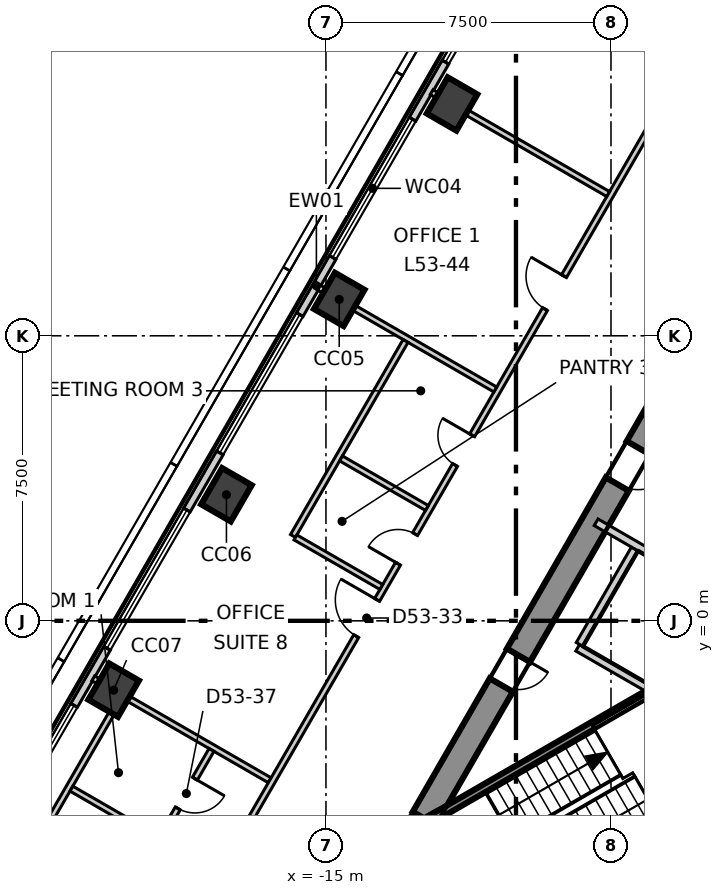
"""IFC4 building model, lengths in metres.
Left out: names, types, materials, properties, quantities, classifications, styles, units other than length and angle.
Written with IfcOpenShell. Run it as: python <this file> out.ifc"""

import sys

from ifc_helpers import new_model, si_unit, direction, frame, frame_2d, origin, origin_2d, place, context, subcontext, project, spatial, polyline, rectangle, outline, extrude, element, fill, save


model = new_model("IFC4")
c1 = context("Model", 3, precision=1e-05, world=origin(), true_north=direction((0.0, 1.0)))
c2 = subcontext(c1, "Body", "Model", "MODEL_VIEW")
j1 = project(units=[si_unit("LENGTHUNIT", "METRE"), si_unit("PLANEANGLEUNIT", "RADIAN")], contexts=[c1])
p1 = place(None, origin())
s1 = spatial("IfcSite", under=j1, at=p1, CompositionType="ELEMENT")
p2 = place(p1, origin())
s2 = spatial("IfcBuilding", under=s1, at=p2, CompositionType="ELEMENT")
p3 = place(p2, frame((0.0, 0.0, 227.3)))
s3 = spatial("IfcBuildingStorey", under=s2, at=p3, CompositionType="ELEMENT", Elevation=227.3)
p4 = place(p3, frame((-1.703, 13.35, -0.3), z_axis=(0.0, 0.0, 1.0), x_axis=(-0.500011533395, -0.866018744874, 0.0)))
e1 = element("IfcWall", 1, at=p4, inside=s3, PredefinedType="SHEAR", context=c2, shape_type="SweptSolid", body=[
    extrude(outline(polyline([(-0.202, -0.35), (1.782, -0.35), (3.766, -0.35), (5.75, -0.35), (7.734, -0.35), (9.718, -0.35), (11.702, -0.35), (13.686, -0.35), (15.67, -0.35), (17.654, -0.35), (19.638, -0.35), (21.622, -0.35), (21.218, 0.35), (19.307, 0.35), (17.397, 0.35), (15.486, 0.35), (13.576, 0.35), (11.665, 0.35), (9.755, 0.35), (7.844, 0.35), (5.934, 0.35), (4.023, 0.35), (2.113, 0.35), (0.202, 0.35), (-0.202, -0.35)])), origin(), (0.0, 0.0, 1.0), 4.0),
])
p5 = place(p4, frame((10.16, 0.0, 0.3)))
e2 = element("IfcOpeningElement", 2, at=p5, cuts=e1, PredefinedType="OPENING", context=c2, shape_type="SweptSolid", body=[
    extrude(rectangle(XDim=1.1, YDim=2.1, at=frame_2d((0.55, 1.05))), frame((0.0, 0.36, 0.0), z_axis=(0.0, -1.0, 0.0), x_axis=(1.0, 0.0, 0.0)), (0.0, 0.0, 1.0), 0.72),
])
p6 = place(p4, frame((16.465, 0.0, 0.3)))
e3 = element("IfcOpeningElement", 3, at=p6, cuts=e1, PredefinedType="OPENING", context=c2, shape_type="SweptSolid", body=[
    extrude(rectangle(XDim=0.9, YDim=2.1, at=frame_2d((0.45, 1.05))), frame((0.0, 0.36, 0.0), z_axis=(0.0, -1.0, 0.0), x_axis=(1.0, 0.0, 0.0)), (0.0, 0.0, 1.0), 0.72),
])
p7 = place(p4, frame((4.055, 0.0, 0.3)))
e4 = element("IfcOpeningElement", 4, at=p7, cuts=e1, PredefinedType="OPENING", context=c2, shape_type="SweptSolid", body=[
    extrude(rectangle(XDim=0.9, YDim=2.1, at=frame_2d((0.45, 1.05))), frame((0.0, 0.36, 0.0), z_axis=(0.0, -1.0, 0.0), x_axis=(1.0, 0.0, 0.0)), (0.0, 0.0, 1.0), 0.72),
])
for number, where, z_axis, x_axis in (
    (5, (-11.682, 13.6, -0.3), (0.0, 0.0, 1.0), (0.5, 0.866, 0.0)),
    (6, (-14.651, 8.458, -0.3), (0.0, 0.0, 1.0), (0.5, 0.866, 0.0)),
    (7, (-17.619, 3.317, -0.3), (0.0, 0.0, 1.0), (0.5, 0.866, 0.0)),
    (8, (-20.587, -1.824, -0.3), (0.0, 0.0, 1.0), (0.5, 0.866, 0.0)),
):
    element("IfcColumn", number, at=place(p3, frame(where, z_axis=z_axis, x_axis=x_axis)), inside=s3, PredefinedType="COLUMN", context=c2, shape_type="SweptSolid", body=[
        extrude(rectangle(XDim=1.1, YDim=0.9, at=origin_2d()), origin(), (0.0, 0.0, 1.0), 4.0),
    ])
p8 = place(p3, frame((-2.732, 30.501, 0.0), z_axis=(0.0, 0.0, 1.0), x_axis=(-0.500023345841, -0.866011924637, 0.0)))
e9 = element("IfcWall", 9, at=p8, inside=s3, PredefinedType="ELEMENTEDWALL", context=c2, shape_type="SweptSolid", body=[
    extrude(rectangle(XDim=50.078, YDim=0.2, at=frame_2d((25.039, 0.0))), origin(), (0.0, 0.0, 1.0), 3.7),
])
p9 = place(p8, frame((2.171, 0.0, 0.9)))
e10 = element("IfcOpeningElement", 10, at=p9, cuts=e9, PredefinedType="OPENING", context=c2, shape_type="SweptSolid", body=[
    extrude(rectangle(XDim=4.2, YDim=2.5, at=frame_2d((2.1, 1.25))), frame((0.0, 0.11, 0.0), z_axis=(0.0, -1.0, 0.0), x_axis=(1.0, 0.0, 0.0)), (0.0, 0.0, 1.0), 0.22),
])
p10 = place(p8, frame((8.107, 0.0, 0.9)))
e11 = element("IfcOpeningElement", 11, at=p10, cuts=e9, PredefinedType="OPENING", context=c2, shape_type="SweptSolid", body=[
    extrude(rectangle(XDim=4.2, YDim=2.5, at=frame_2d((2.1, 1.25))), frame((0.0, 0.11, 0.0), z_axis=(0.0, -1.0, 0.0), x_axis=(1.0, 0.0, 0.0)), (0.0, 0.0, 1.0), 0.22),
])
p11 = place(p8, frame((14.044, 0.0, 0.9)))
e12 = element("IfcOpeningElement", 12, at=p11, cuts=e9, PredefinedType="OPENING", context=c2, shape_type="SweptSolid", body=[
    extrude(rectangle(XDim=4.2, YDim=2.5, at=frame_2d((2.1, 1.25))), frame((0.0, 0.11, 0.0), z_axis=(0.0, -1.0, 0.0), x_axis=(1.0, 0.0, 0.0)), (0.0, 0.0, 1.0), 0.22),
])
p12 = place(p8, frame((19.98, 0.0, 0.9)))
e13 = element("IfcOpeningElement", 13, at=p12, cuts=e9, PredefinedType="OPENING", context=c2, shape_type="SweptSolid", body=[
    extrude(rectangle(XDim=4.2, YDim=2.5, at=frame_2d((2.1, 1.25))), frame((0.0, 0.11, 0.0), z_axis=(0.0, -1.0, 0.0), x_axis=(1.0, 0.0, 0.0)), (0.0, 0.0, 1.0), 0.22),
])
p13 = place(p8, frame((25.917, 0.0, 0.9)))
e14 = element("IfcOpeningElement", 14, at=p13, cuts=e9, PredefinedType="OPENING", context=c2, shape_type="SweptSolid", body=[
    extrude(rectangle(XDim=4.2, YDim=2.5, at=frame_2d((2.1, 1.25))), frame((0.0, 0.11, 0.0), z_axis=(0.0, -1.0, 0.0), x_axis=(1.0, 0.0, 0.0)), (0.0, 0.0, 1.0), 0.22),
])
p14 = place(p8, frame((31.853, 0.0, 0.9)))
e15 = element("IfcOpeningElement", 15, at=p14, cuts=e9, PredefinedType="OPENING", context=c2, shape_type="SweptSolid", body=[
    extrude(rectangle(XDim=4.2, YDim=2.5, at=frame_2d((2.1, 1.25))), frame((0.0, 0.11, 0.0), z_axis=(0.0, -1.0, 0.0), x_axis=(1.0, 0.0, 0.0)), (0.0, 0.0, 1.0), 0.22),
])
p15 = place(p8, frame((37.79, 0.0, 0.9)))
e16 = element("IfcOpeningElement", 16, at=p15, cuts=e9, PredefinedType="OPENING", context=c2, shape_type="SweptSolid", body=[
    extrude(rectangle(XDim=4.2, YDim=2.5, at=frame_2d((2.1, 1.25))), frame((0.0, 0.11, 0.0), z_axis=(0.0, -1.0, 0.0), x_axis=(1.0, 0.0, 0.0)), (0.0, 0.0, 1.0), 0.22),
])
p16 = place(p8, frame((43.726, 0.0, 0.9)))
e17 = element("IfcOpeningElement", 17, at=p16, cuts=e9, PredefinedType="OPENING", context=c2, shape_type="SweptSolid", body=[
    extrude(rectangle(XDim=4.2, YDim=2.5, at=frame_2d((2.1, 1.25))), frame((0.0, 0.11, 0.0), z_axis=(0.0, -1.0, 0.0), x_axis=(1.0, 0.0, 0.0)), (0.0, 0.0, 1.0), 0.22),
])
p17 = place(p3, frame((-21.124, -1.514, 0.0), z_axis=(0.0, 0.0, 1.0), x_axis=(0.866032438121, -0.499987815973, 0.0)))
e18 = element("IfcWall", 18, at=p17, inside=s3, PredefinedType="PARTITIONING", context=c2, shape_type="SweptSolid", body=[
    extrude(rectangle(XDim=5.363, YDim=0.15, at=frame_2d((2.681, 0.0))), origin(), (0.0, 0.0, 1.0), 3.7),
])
p18 = place(p3, frame((-20.882, -11.969, 0.0), z_axis=(0.0, 0.0, 1.0), x_axis=(0.499998738735, 0.866026131975, 0.0)))
e19 = element("IfcWall", 19, at=p18, inside=s3, PredefinedType="PARTITIONING", context=c2, shape_type="SweptSolid", body=[
    extrude(rectangle(XDim=41.764, YDim=0.15, at=frame_2d((20.882, 0.0))), origin(), (0.0, 0.0, 1.0), 3.7),
])
p19 = place(p18, frame((33.714, 0.0, 0.0)))
e20 = element("IfcOpeningElement", 20, at=p19, cuts=e19, PredefinedType="OPENING", context=c2, shape_type="SweptSolid", body=[
    extrude(rectangle(XDim=1.1, YDim=2.1, at=frame_2d((0.55, 1.05))), frame((0.0, 0.085, 0.0), z_axis=(0.0, -1.0, 0.0), x_axis=(1.0, 0.0, 0.0)), (0.0, 0.0, 1.0), 0.17),
])
p20 = place(p18, frame((23.293, 0.0, 0.0)))
e21 = element("IfcOpeningElement", 21, at=p20, cuts=e19, PredefinedType="OPENING", context=c2, shape_type="SweptSolid", body=[
    extrude(rectangle(XDim=1.0, YDim=2.1, at=frame_2d((0.5, 1.05))), frame((0.0, 0.085, 0.0), z_axis=(0.0, -1.0, 0.0), x_axis=(1.0, 0.0, 0.0)), (0.0, 0.0, 1.0), 0.17),
])
p21 = place(p18, frame((13.356, 0.0, 0.0)))
e22 = element("IfcOpeningElement", 22, at=p21, cuts=e19, PredefinedType="OPENING", context=c2, shape_type="SweptSolid", body=[
    extrude(rectangle(XDim=1.1, YDim=2.1, at=frame_2d((0.55, 1.05))), frame((0.0, 0.085, 0.0), z_axis=(0.0, -1.0, 0.0), x_axis=(1.0, 0.0, 0.0)), (0.0, 0.0, 1.0), 0.17),
])
p22 = place(p18, frame((18.556, 0.0, 0.0)))
e23 = element("IfcOpeningElement", 23, at=p22, cuts=e19, PredefinedType="OPENING", context=c2, shape_type="SweptSolid", body=[
    extrude(rectangle(XDim=0.9, YDim=2.1, at=frame_2d((0.45, 1.05))), frame((0.0, 0.085, 0.0), z_axis=(0.0, -1.0, 0.0), x_axis=(1.0, 0.0, 0.0)), (0.0, 0.0, 1.0), 0.17),
])
p23 = place(p18, frame((15.556, 0.0, 0.0)))
e24 = element("IfcOpeningElement", 24, at=p23, cuts=e19, PredefinedType="OPENING", context=c2, shape_type="SweptSolid", body=[
    extrude(rectangle(XDim=0.9, YDim=2.1, at=frame_2d((0.45, 1.05))), frame((0.0, 0.085, 0.0), z_axis=(0.0, -1.0, 0.0), x_axis=(1.0, 0.0, 0.0)), (0.0, 0.0, 1.0), 0.17),
])
p24 = place(p18, frame((3.883, 0.0, 0.0)))
e25 = element("IfcOpeningElement", 25, at=p24, cuts=e19, PredefinedType="OPENING", context=c2, shape_type="SweptSolid", body=[
    extrude(rectangle(XDim=1.1, YDim=2.1, at=frame_2d((0.55, 1.05))), frame((0.0, 0.085, 0.0), z_axis=(0.0, -1.0, 0.0), x_axis=(1.0, 0.0, 0.0)), (0.0, 0.0, 1.0), 0.17),
])
p25 = place(p3, frame((-15.188, 8.768, 0.0), z_axis=(0.0, 0.0, 1.0), x_axis=(0.866032438121, -0.499987815973, 0.0)))
e26 = element("IfcWall", 26, at=p25, inside=s3, PredefinedType="PARTITIONING", context=c2, shape_type="SweptSolid", body=[
    extrude(rectangle(XDim=5.363, YDim=0.15, at=frame_2d((2.681, 0.0))), origin(), (0.0, 0.0, 1.0), 3.2),
])
p26 = place(p3, frame((-15.868, 2.233, 0.0), z_axis=(0.0, 0.0, 1.0), x_axis=(0.499932914044, 0.866064132415, 0.0)))
e27 = element("IfcWall", 27, at=p26, inside=s3, PredefinedType="PARTITIONING", context=c2, shape_type="SweptSolid", body=[
    extrude(rectangle(XDim=5.925, YDim=0.15, at=frame_2d((2.962, 0.0))), origin(), (0.0, 0.0, 1.0), 3.7),
])
for number, where, z_axis, x_axis in (
    (28, (-15.803, 2.195, 0.0), (0.0, 0.0, 1.0), (0.866, -0.5, 0.0)),
    (29, (-14.603, 4.273, 0.0), (0.0, 0.0, 1.0), (0.866, -0.5, 0.0)),
):
    element("IfcWall", number, at=place(p3, frame(where, z_axis=z_axis, x_axis=x_axis)), inside=s3, PredefinedType="PARTITIONING", context=c2, shape_type="SweptSolid", body=[
        extrude(rectangle(XDim=2.608, YDim=0.15, at=frame_2d((1.304, 0.0))), origin(), (0.0, 0.0, 1.0), 3.7),
    ])
p27 = place(p3, frame((-12.219, 13.91, 0.0), z_axis=(0.0, 0.0, 1.0), x_axis=(0.866052151752, -0.499953668299, 0.0)))
e30 = element("IfcWall", 30, at=p27, inside=s3, PredefinedType="PARTITIONING", context=c2, shape_type="SweptSolid", body=[
    extrude(rectangle(XDim=5.362, YDim=0.15, at=frame_2d((2.681, 0.0))), origin(), (0.0, 0.0, 1.0), 3.7),
])
p28 = place(p3, frame((-20.774, -8.182, 0.0), z_axis=(0.0, 0.0, 1.0), x_axis=(0.499917542299, 0.866073005526, 0.0)))
e31 = element("IfcWall", 31, at=p28, inside=s3, PredefinedType="PARTITIONING", context=c2, shape_type="SweptSolid", body=[
    extrude(rectangle(XDim=5.525, YDim=0.15, at=frame_2d((2.762, 0.0))), origin(), (0.0, 0.0, 1.0), 3.7),
])
p29 = place(p28, frame((3.75, 0.0, 0.0)))
e32 = element("IfcOpeningElement", 32, at=p29, cuts=e31, PredefinedType="OPENING", context=c2, shape_type="SweptSolid", body=[
    extrude(rectangle(XDim=0.9, YDim=2.1, at=frame_2d((0.45, 1.05))), frame((0.0, 0.085, 0.0), z_axis=(0.0, -1.0, 0.0), x_axis=(1.0, 0.0, 0.0)), (0.0, 0.0, 1.0), 0.17),
])
p30 = place(p28, frame((0.95, 0.0, 0.0)))
e33 = element("IfcOpeningElement", 33, at=p30, cuts=e31, PredefinedType="OPENING", context=c2, shape_type="SweptSolid", body=[
    extrude(rectangle(XDim=0.9, YDim=2.1, at=frame_2d((0.45, 1.05))), frame((0.0, 0.085, 0.0), z_axis=(0.0, -1.0, 0.0), x_axis=(1.0, 0.0, 0.0)), (0.0, 0.0, 1.0), 0.17),
])
p31 = place(p3, frame((-23.163, -6.803, 0.0), z_axis=(0.0, 0.0, 1.0), x_axis=(0.499950687084, 0.866053872738, 0.0)))
e34 = element("IfcWall", 34, at=p31, inside=s3, PredefinedType="PARTITIONING", context=c2, shape_type="SweptSolid", body=[
    extrude(rectangle(XDim=5.525, YDim=0.15, at=frame_2d((2.762, 0.0))), origin(), (0.0, 0.0, 1.0), 2.95),
])
p32 = place(p3, frame((-21.698, -4.416, 0.0), z_axis=(0.0, 0.0, 1.0), x_axis=(0.8660749285, -0.499914210863, 0.0)))
e35 = element("IfcWall", 35, at=p32, inside=s3, PredefinedType="PARTITIONING", context=c2, shape_type="SweptSolid", body=[
    extrude(rectangle(XDim=2.608, YDim=0.15, at=frame_2d((1.304, 0.0))), origin(), (0.0, 0.0, 1.0), 3.7),
])
p33 = place(p3, frame((-8.376, -0.707, 0.0), z_axis=(0.0, 0.0, 1.0), x_axis=(0.866067520717, -0.499927044236, 0.0)))
e36 = element("IfcWall", 36, at=p33, inside=s3, PredefinedType="SOLIDWALL", context=c2, shape_type="SweptSolid", body=[
    extrude(rectangle(XDim=2.1, YDim=0.2, at=frame_2d((1.05, 0.0))), origin(), (0.0, 0.0, 1.0), 3.7),
])
p34 = place(p3, frame((-8.326, -0.62, 0.0), z_axis=(0.0, 0.0, 1.0), x_axis=(0.500023687443, 0.866011727401, 0.0)))
e37 = element("IfcWall", 37, at=p34, inside=s3, PredefinedType="SOLIDWALL", context=c2, shape_type="SweptSolid", body=[
    extrude(rectangle(XDim=2.9, YDim=0.2, at=frame_2d((1.45, 0.0))), origin(), (0.0, 0.0, 1.0), 3.7),
])
p35 = place(p3, frame((-7.891, 2.593, 0.0), z_axis=(0.0, 0.0, 1.0), x_axis=(0.866070917804, -0.499921159118, 0.0)))
e38 = element("IfcWall", 38, at=p35, inside=s3, PredefinedType="SOLIDWALL", context=c2, shape_type="SweptSolid", body=[
    extrude(rectangle(XDim=3.333, YDim=0.2, at=frame_2d((1.666, 0.0))), origin(), (0.0, 0.0, 1.0), 3.7),
])
p36 = place(p35, frame((1.73, 0.0, 0.0)))
e39 = element("IfcOpeningElement", 39, at=p36, cuts=e38, PredefinedType="OPENING", context=c2, shape_type="SweptSolid", body=[
    extrude(rectangle(XDim=1.1, YDim=2.1, at=frame_2d((0.55, 1.05))), frame((0.0, 0.11, 0.0), z_axis=(0.0, -1.0, 0.0), x_axis=(1.0, 0.0, 0.0)), (0.0, 0.0, 1.0), 0.22),
])
p37 = place(p3, frame((-12.344, -5.279, 0.0), z_axis=(0.0, 0.0, 1.0), x_axis=(0.866046323291, 0.499963764601, 0.0)))
e40 = element("IfcWall", 40, at=p37, inside=s3, PredefinedType="SOLIDWALL", context=c2, shape_type="SweptSolid", body=[
    extrude(rectangle(XDim=6.714, YDim=0.2, at=frame_2d((3.357, 0.0))), origin(), (0.0, 0.0, 1.0), 3.7),
])
p38 = place(p3, frame((-10.744, -8.051, 0.0), z_axis=(0.0, 0.0, 1.0), x_axis=(0.865983344943, 0.500072840975, 0.0)))
e41 = element("IfcWall", 41, at=p38, inside=s3, PredefinedType="SOLIDWALL", context=c2, shape_type="SweptSolid", body=[
    extrude(rectangle(XDim=6.715, YDim=0.2, at=frame_2d((3.357, 0.0))), origin(), (0.0, 0.0, 1.0), 3.7),
])
p39 = place(p11, origin())
e42 = element("IfcWindow", 42, at=p39, inside=s3, PartitioningType="SINGLE_PANEL", PredefinedType="WINDOW", context=c2, shape_type="SweptSolid", body=[
    extrude(rectangle(XDim=4.2, YDim=2.5, at=frame_2d((2.1, 1.25))), frame((0.0, 0.03, 0.0), z_axis=(0.0, -1.0, 0.0), x_axis=(1.0, 0.0, 0.0)), (0.0, 0.0, 1.0), 0.06),
])
fill(e12, e42)
p40 = place(p12, origin())
e43 = element("IfcWindow", 43, at=p40, inside=s3, PartitioningType="SINGLE_PANEL", PredefinedType="WINDOW", context=c2, shape_type="SweptSolid", body=[
    extrude(rectangle(XDim=4.2, YDim=2.5, at=frame_2d((2.1, 1.25))), frame((0.0, 0.03, 0.0), z_axis=(0.0, -1.0, 0.0), x_axis=(1.0, 0.0, 0.0)), (0.0, 0.0, 1.0), 0.06),
])
fill(e13, e43)
p41 = place(p13, origin())
e44 = element("IfcWindow", 44, at=p41, inside=s3, PartitioningType="SINGLE_PANEL", PredefinedType="WINDOW", context=c2, shape_type="SweptSolid", body=[
    extrude(rectangle(XDim=4.2, YDim=2.5, at=frame_2d((2.1, 1.25))), frame((0.0, 0.03, 0.0), z_axis=(0.0, -1.0, 0.0), x_axis=(1.0, 0.0, 0.0)), (0.0, 0.0, 1.0), 0.06),
])
fill(e14, e44)
p42 = place(p14, origin())
e45 = element("IfcWindow", 45, at=p42, inside=s3, PartitioningType="SINGLE_PANEL", PredefinedType="WINDOW", context=c2, shape_type="SweptSolid", body=[
    extrude(rectangle(XDim=4.2, YDim=2.5, at=frame_2d((2.1, 1.25))), frame((0.0, 0.03, 0.0), z_axis=(0.0, -1.0, 0.0), x_axis=(1.0, 0.0, 0.0)), (0.0, 0.0, 1.0), 0.06),
])
fill(e15, e45)
p43 = place(p15, origin())
e46 = element("IfcWindow", 46, at=p43, inside=s3, PartitioningType="SINGLE_PANEL", PredefinedType="WINDOW", context=c2, shape_type="SweptSolid", body=[
    extrude(rectangle(XDim=4.2, YDim=2.5, at=frame_2d((2.1, 1.25))), frame((0.0, 0.03, 0.0), z_axis=(0.0, -1.0, 0.0), x_axis=(1.0, 0.0, 0.0)), (0.0, 0.0, 1.0), 0.06),
])
fill(e16, e46)
p44 = place(p20, origin())
e47 = element("IfcDoor", 47, at=p44, inside=s3, OperationType="SINGLE_SWING_LEFT", PredefinedType="DOOR", context=c2, shape_type="SweptSolid", body=[
    extrude(rectangle(XDim=1.0, YDim=2.1, at=frame_2d((0.5, 1.05))), frame((0.0, 0.025, 0.0), z_axis=(0.0, -1.0, 0.0), x_axis=(1.0, 0.0, 0.0)), (0.0, 0.0, 1.0), 0.05),
])
fill(e21, e47)
p45 = place(p21, origin())
e48 = element("IfcDoor", 48, at=p45, inside=s3, OperationType="SINGLE_SWING_LEFT", PredefinedType="DOOR", context=c2, shape_type="SweptSolid", body=[
    extrude(rectangle(XDim=1.1, YDim=2.1, at=frame_2d((0.55, 1.05))), frame((0.0, 0.025, 0.0), z_axis=(0.0, -1.0, 0.0), x_axis=(1.0, 0.0, 0.0)), (0.0, 0.0, 1.0), 0.05),
])
fill(e22, e48)
p46 = place(p22, origin())
e49 = element("IfcDoor", 49, at=p46, inside=s3, OperationType="SINGLE_SWING_LEFT", PredefinedType="DOOR", context=c2, shape_type="SweptSolid", body=[
    extrude(rectangle(XDim=0.9, YDim=2.1, at=frame_2d((0.45, 1.05))), frame((0.0, 0.025, 0.0), z_axis=(0.0, -1.0, 0.0), x_axis=(1.0, 0.0, 0.0)), (0.0, 0.0, 1.0), 0.05),
])
fill(e23, e49)
p47 = place(p23, origin())
e50 = element("IfcDoor", 50, at=p47, inside=s3, OperationType="SINGLE_SWING_RIGHT", PredefinedType="DOOR", context=c2, shape_type="SweptSolid", body=[
    extrude(rectangle(XDim=0.9, YDim=2.1, at=frame_2d((0.45, 1.05))), frame((0.0, 0.025, 0.0), z_axis=(0.0, -1.0, 0.0), x_axis=(1.0, 0.0, 0.0)), (0.0, 0.0, 1.0), 0.05),
])
fill(e24, e50)
p48 = place(p29, origin())
e51 = element("IfcDoor", 51, at=p48, inside=s3, OperationType="SINGLE_SWING_RIGHT", PredefinedType="DOOR", context=c2, shape_type="SweptSolid", body=[
    extrude(rectangle(XDim=0.9, YDim=2.1, at=frame_2d((0.45, 1.05))), frame((0.0, 0.025, 0.0), z_axis=(0.0, -1.0, 0.0), x_axis=(1.0, 0.0, 0.0)), (0.0, 0.0, 1.0), 0.05),
])
fill(e32, e51)
p49 = place(p5, origin())
e52 = element("IfcDoor", 52, at=p49, inside=s3, OperationType="SINGLE_SWING_RIGHT", PredefinedType="DOOR", context=c2, shape_type="SweptSolid", body=[
    extrude(rectangle(XDim=1.1, YDim=2.1, at=frame_2d((0.55, 1.05))), frame((0.0, 0.025, 0.0), z_axis=(0.0, -1.0, 0.0), x_axis=(1.0, 0.0, 0.0)), (0.0, 0.0, 1.0), 0.05),
])
fill(e2, e52)
p50 = place(p6, origin())
e53 = element("IfcDoor", 53, at=p50, inside=s3, OperationType="SINGLE_SWING_RIGHT", PredefinedType="DOOR", context=c2, shape_type="SweptSolid", body=[
    extrude(rectangle(XDim=0.9, YDim=2.1, at=frame_2d((0.45, 1.05))), frame((0.0, 0.025, 0.0), z_axis=(0.0, -1.0, 0.0), x_axis=(1.0, 0.0, 0.0)), (0.0, 0.0, 1.0), 0.05),
])
fill(e3, e53)
save(model, sys.argv[1])
